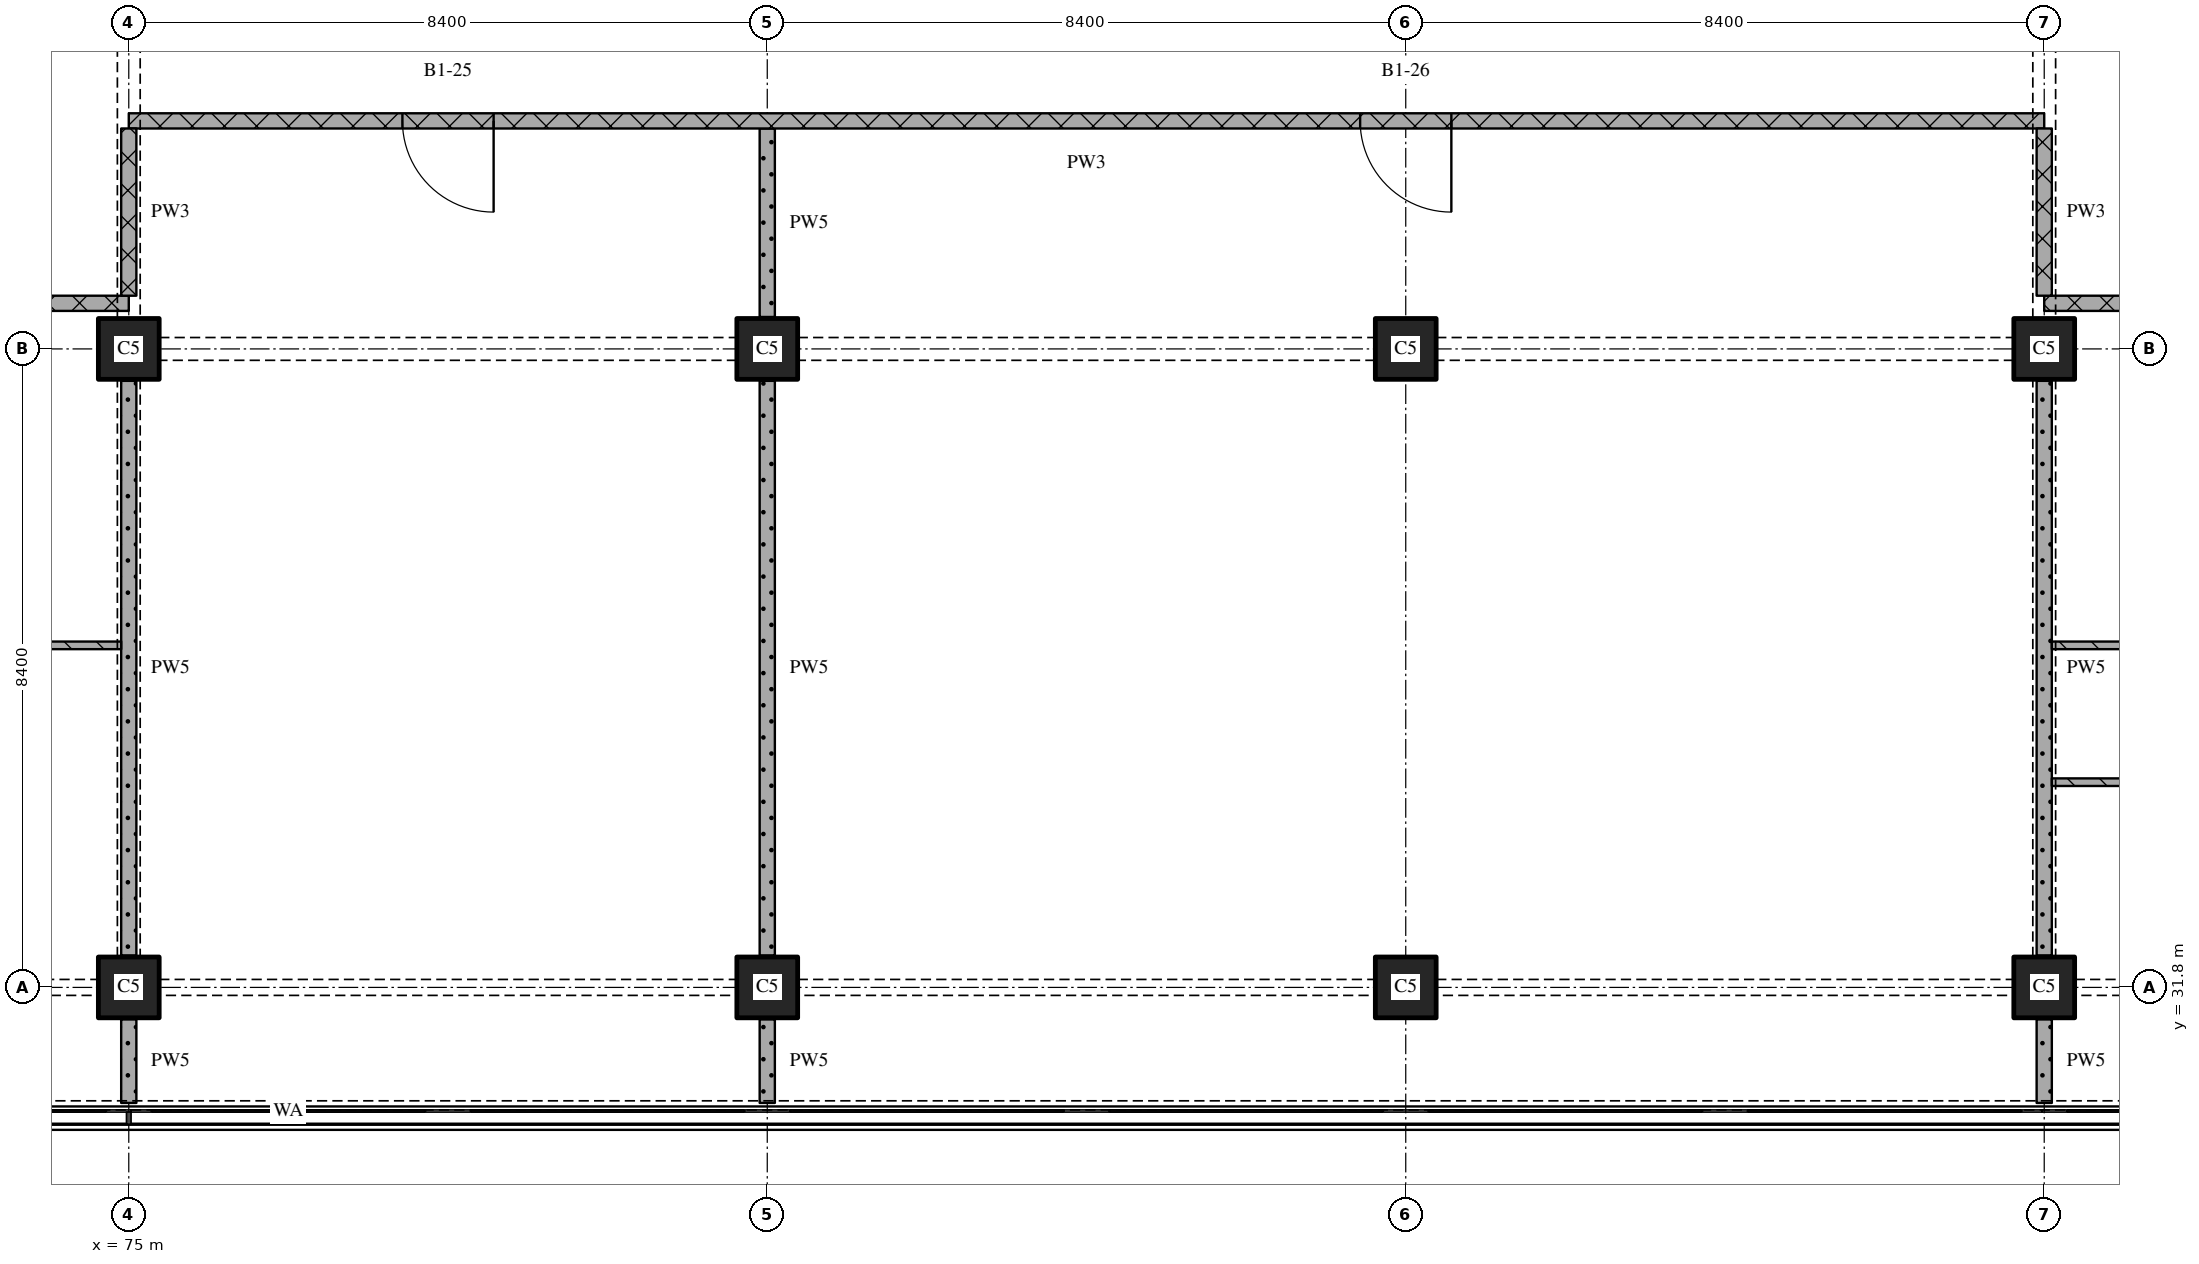
"""IFC4 building model, lengths in metres.
Left out: names, types, materials, properties, quantities, classifications, styles, units other than length and angle.
Written with IfcOpenShell. Run it as: python <this file> out.ifc"""

import sys

from ifc_helpers import new_model, si_unit, direction, frame, frame_2d, origin, origin_2d, place, context, subcontext, project, spatial, rectangle, extrude, element, fill, save


model = new_model("IFC4")
c1 = context("Model", 3, precision=1e-05, world=origin(), true_north=direction((0.0, 1.0)))
c2 = subcontext(c1, "Body", "Model", "MODEL_VIEW")
j1 = project(units=[si_unit("LENGTHUNIT", "METRE"), si_unit("PLANEANGLEUNIT", "RADIAN")], contexts=[c1])
p1 = place(None, origin())
s1 = spatial("IfcSite", under=j1, at=p1, CompositionType="ELEMENT")
p2 = place(p1, origin())
s2 = spatial("IfcBuilding", under=s1, at=p2, CompositionType="ELEMENT")
p3 = place(p2, frame((0.0, 0.0, 98.85)))
s3 = spatial("IfcBuildingStorey", under=s2, at=p3, CompositionType="ELEMENT", Elevation=98.85)
for number, where, z_axis, x_axis in (
    (1, (75.0, 31.8, 0.0), (0.0, 0.0, 1.0), (1.0, 0.0, 0.0)),
    (2, (75.0, 40.2, 0.0), (0.0, 0.0, 1.0), (1.0, 0.0, 0.0)),
    (3, (83.4, 31.8, 0.0), (0.0, 0.0, 1.0), (1.0, 0.0, 0.0)),
    (4, (83.4, 40.2, 0.0), (0.0, 0.0, 1.0), (1.0, 0.0, 0.0)),
    (5, (91.8, 31.8, 0.0), (0.0, 0.0, 1.0), (1.0, 0.0, 0.0)),
    (6, (91.8, 40.2, 0.0), (0.0, 0.0, 1.0), (1.0, 0.0, 0.0)),
    (7, (100.2, 31.8, 0.0), (0.0, 0.0, 1.0), (1.0, 0.0, 0.0)),
    (8, (100.2, 40.2, 0.0), (0.0, 0.0, 1.0), (1.0, 0.0, 0.0)),
):
    element("IfcColumn", number, at=place(p3, frame(where, z_axis=z_axis, x_axis=x_axis)), inside=s3, PredefinedType="COLUMN", context=c2, shape_type="SweptSolid", body=[
        extrude(rectangle(XDim=0.8, YDim=0.8, at=origin_2d()), origin(), (0.0, 0.0, 1.0), 3.6),
    ])
p4 = place(p3, frame((117.0, 34.5, 0.0), z_axis=(0.0, 0.0, 1.0), x_axis=(-1.0, 0.0, 0.0)))
e9 = element("IfcWall", 9, at=p4, inside=s3, PredefinedType="PARTITIONING", context=c2, shape_type="SweptSolid", body=[
    extrude(rectangle(XDim=16.7, YDim=0.1, at=frame_2d((8.35, 0.0))), origin(), (0.0, 0.0, 1.0), 3.32),
])
p5 = place(p4, frame((12.15, 0.0, 0.0)))
e10 = element("IfcOpeningElement", 10, at=p5, cuts=e9, PredefinedType="OPENING", context=c2, shape_type="SweptSolid", body=[
    extrude(rectangle(XDim=0.9, YDim=2.1, at=frame_2d((0.45, 1.05))), frame((0.0, 0.06, 0.0), z_axis=(0.0, -1.0, 0.0), x_axis=(1.0, 0.0, 0.0)), (0.0, 0.0, 1.0), 0.12),
])
p6 = place(p3, frame((65.7, 36.3, 0.0), z_axis=(0.0, 0.0, 1.0), x_axis=(1.0, 0.0, 0.0)))
e11 = element("IfcWall", 11, at=p6, inside=s3, PredefinedType="PARTITIONING", context=c2, shape_type="SweptSolid", body=[
    extrude(rectangle(XDim=9.2, YDim=0.1, at=frame_2d((4.6, 0.0))), origin(), (0.0, 0.0, 1.0), 3.32),
])
p7 = place(p6, frame((6.5, 0.0, 0.0)))
e12 = element("IfcOpeningElement", 12, at=p7, cuts=e11, PredefinedType="OPENING", context=c2, shape_type="SweptSolid", body=[
    extrude(rectangle(XDim=0.8, YDim=2.1, at=frame_2d((0.4, 1.05))), frame((0.0, 0.06, 0.0), z_axis=(0.0, -1.0, 0.0), x_axis=(1.0, 0.0, 0.0)), (0.0, 0.0, 1.0), 0.12),
])
p8 = place(p3, frame((100.3, 36.3, 0.0), z_axis=(0.0, 0.0, 1.0), x_axis=(1.0, 0.0, 0.0)))
e13 = element("IfcWall", 13, at=p8, inside=s3, PredefinedType="PARTITIONING", context=c2, shape_type="SweptSolid", body=[
    extrude(rectangle(XDim=9.2, YDim=0.1, at=frame_2d((4.6, 0.0))), origin(), (0.0, 0.0, 1.0), 3.32),
])
p9 = place(p8, frame((1.75, 0.0, 0.0)))
e14 = element("IfcOpeningElement", 14, at=p9, cuts=e13, PredefinedType="OPENING", context=c2, shape_type="SweptSolid", body=[
    extrude(rectangle(XDim=0.8, YDim=2.1, at=frame_2d((0.4, 1.05))), frame((0.0, 0.06, 0.0), z_axis=(0.0, -1.0, 0.0), x_axis=(1.0, 0.0, 0.0)), (0.0, 0.0, 1.0), 0.12),
])
p10 = place(p3, frame((75.0, 40.8, 0.0), z_axis=(0.0, 0.0, 1.0), x_axis=(-1.0, 0.0, 0.0)))
e15 = element("IfcWall", 15, at=p10, inside=s3, PredefinedType="PARTITIONING", context=c2, shape_type="SweptSolid", body=[
    extrude(rectangle(XDim=24.18, YDim=0.2, at=frame_2d((12.09, 0.0))), origin(), (0.0, 0.0, 1.0), 3.32),
])
p11 = place(p10, frame((9.55, 0.0, 0.0)))
e16 = element("IfcOpeningElement", 16, at=p11, cuts=e15, PredefinedType="OPENING", context=c2, shape_type="SweptSolid", body=[
    extrude(rectangle(XDim=1.0, YDim=2.1, at=frame_2d((0.5, 1.05))), frame((0.0, 0.11, 0.0), z_axis=(0.0, -1.0, 0.0), x_axis=(1.0, 0.0, 0.0)), (0.0, 0.0, 1.0), 0.22),
])
p12 = place(p3, frame((124.38, 40.8, 0.0), z_axis=(0.0, 0.0, 1.0), x_axis=(-1.0, 0.0, 0.0)))
e17 = element("IfcWall", 17, at=p12, inside=s3, PredefinedType="PARTITIONING", context=c2, shape_type="SweptSolid", body=[
    extrude(rectangle(XDim=24.18, YDim=0.2, at=frame_2d((12.09, 0.0))), origin(), (0.0, 0.0, 1.0), 3.32),
])
p13 = place(p12, frame((13.63, 0.0, 0.0)))
e18 = element("IfcOpeningElement", 18, at=p13, cuts=e17, PredefinedType="OPENING", context=c2, shape_type="SweptSolid", body=[
    extrude(rectangle(XDim=1.0, YDim=2.1, at=frame_2d((0.5, 1.05))), frame((0.0, 0.11, 0.0), z_axis=(0.0, -1.0, 0.0), x_axis=(1.0, 0.0, 0.0)), (0.0, 0.0, 1.0), 0.22),
])
p14 = place(p3, frame((100.2, 43.2, 0.0), z_axis=(0.0, 0.0, 1.0), x_axis=(-1.0, 0.0, 0.0)))
e19 = element("IfcWall", 19, at=p14, inside=s3, PredefinedType="PARTITIONING", context=c2, shape_type="SweptSolid", body=[
    extrude(rectangle(XDim=25.2, YDim=0.2, at=frame_2d((12.6, 0.0))), origin(), (0.0, 0.0, 1.0), 3.32),
])
p15 = place(p14, frame((7.8, 0.0, 0.0)))
e20 = element("IfcOpeningElement", 20, at=p15, cuts=e19, PredefinedType="OPENING", context=c2, shape_type="SweptSolid", body=[
    extrude(rectangle(XDim=1.2, YDim=2.1, at=frame_2d((0.6, 1.05))), frame((0.0, 0.11, 0.0), z_axis=(0.0, -1.0, 0.0), x_axis=(1.0, 0.0, 0.0)), (0.0, 0.0, 1.0), 0.22),
])
p16 = place(p14, frame((20.4, 0.0, 0.0)))
e21 = element("IfcOpeningElement", 21, at=p16, cuts=e19, PredefinedType="OPENING", context=c2, shape_type="SweptSolid", body=[
    extrude(rectangle(XDim=1.2, YDim=2.1, at=frame_2d((0.6, 1.05))), frame((0.0, 0.11, 0.0), z_axis=(0.0, -1.0, 0.0), x_axis=(1.0, 0.0, 0.0)), (0.0, 0.0, 1.0), 0.22),
])
p17 = place(p3, frame((75.0, 43.1, 0.0), z_axis=(0.0, 0.0, 1.0), x_axis=(0.0, -1.0, 0.0)))
e22 = element("IfcWall", 22, at=p17, inside=s3, PredefinedType="PARTITIONING", context=c2, shape_type="SweptSolid", body=[
    extrude(rectangle(XDim=2.2, YDim=0.2, at=frame_2d((1.1, 0.0))), origin(), (0.0, 0.0, 1.0), 2.43),
])
p18 = place(p3, frame((75.0, 31.38, 0.0), z_axis=(0.0, 0.0, 1.0), x_axis=(0.0, -1.0, 0.0)))
e23 = element("IfcWall", 23, at=p18, inside=s3, PredefinedType="PARTITIONING", context=c2, shape_type="SweptSolid", body=[
    extrude(rectangle(XDim=1.1, YDim=0.2, at=frame_2d((0.55, 0.0))), origin(), (0.0, 0.0, 1.0), 3.32),
])
p19 = place(p3, frame((75.0, 39.78, 0.0), z_axis=(0.0, 0.0, 1.0), x_axis=(0.0, -1.0, 0.0)))
e24 = element("IfcWall", 24, at=p19, inside=s3, PredefinedType="PARTITIONING", context=c2, shape_type="SweptSolid", body=[
    extrude(rectangle(XDim=7.56, YDim=0.2, at=frame_2d((3.78, 0.0))), origin(), (0.0, 0.0, 1.0), 2.83),
])
p20 = place(p3, frame((83.4, 31.38, 0.0), z_axis=(0.0, 0.0, 1.0), x_axis=(0.0, -1.0, 0.0)))
e25 = element("IfcWall", 25, at=p20, inside=s3, PredefinedType="PARTITIONING", context=c2, shape_type="SweptSolid", body=[
    extrude(rectangle(XDim=1.1, YDim=0.2, at=frame_2d((0.55, 0.0))), origin(), (0.0, 0.0, 1.0), 3.32),
])
p21 = place(p3, frame((83.4, 39.78, 0.0), z_axis=(0.0, 0.0, 1.0), x_axis=(0.0, -1.0, 0.0)))
e26 = element("IfcWall", 26, at=p21, inside=s3, PredefinedType="PARTITIONING", context=c2, shape_type="SweptSolid", body=[
    extrude(rectangle(XDim=7.56, YDim=0.2, at=frame_2d((3.78, 0.0))), origin(), (0.0, 0.0, 1.0), 3.32),
])
p22 = place(p3, frame((83.4, 43.1, 0.0), z_axis=(0.0, 0.0, 1.0), x_axis=(0.0, -1.0, 0.0)))
e27 = element("IfcWall", 27, at=p22, inside=s3, PredefinedType="PARTITIONING", context=c2, shape_type="SweptSolid", body=[
    extrude(rectangle(XDim=2.48, YDim=0.2, at=frame_2d((1.24, 0.0))), origin(), (0.0, 0.0, 1.0), 3.32),
])
p23 = place(p3, frame((100.2, 43.1, 0.0), z_axis=(0.0, 0.0, 1.0), x_axis=(0.0, -1.0, 0.0)))
e28 = element("IfcWall", 28, at=p23, inside=s3, PredefinedType="PARTITIONING", context=c2, shape_type="SweptSolid", body=[
    extrude(rectangle(XDim=2.2, YDim=0.2, at=frame_2d((1.1, 0.0))), origin(), (0.0, 0.0, 1.0), 2.43),
])
p24 = place(p3, frame((100.2, 31.38, 0.0), z_axis=(0.0, 0.0, 1.0), x_axis=(0.0, -1.0, 0.0)))
e29 = element("IfcWall", 29, at=p24, inside=s3, PredefinedType="PARTITIONING", context=c2, shape_type="SweptSolid", body=[
    extrude(rectangle(XDim=1.1, YDim=0.2, at=frame_2d((0.55, 0.0))), origin(), (0.0, 0.0, 1.0), 3.32),
])
p25 = place(p3, frame((100.2, 39.78, 0.0), z_axis=(0.0, 0.0, 1.0), x_axis=(0.0, -1.0, 0.0)))
e30 = element("IfcWall", 30, at=p25, inside=s3, PredefinedType="PARTITIONING", context=c2, shape_type="SweptSolid", body=[
    extrude(rectangle(XDim=7.56, YDim=0.2, at=frame_2d((3.78, 0.0))), origin(), (0.0, 0.0, 1.0), 2.83),
])
p26 = place(p15, origin())
e31 = element("IfcDoor", 31, at=p26, inside=s3, OperationType="SINGLE_SWING_LEFT", PredefinedType="DOOR", context=c2, shape_type="SweptSolid", body=[
    extrude(rectangle(XDim=1.2, YDim=2.1, at=frame_2d((0.6, 1.05))), frame((0.0, 0.025, 0.0), z_axis=(0.0, -1.0, 0.0), x_axis=(1.0, 0.0, 0.0)), (0.0, 0.0, 1.0), 0.05),
])
fill(e20, e31)
p27 = place(p16, origin())
e32 = element("IfcDoor", 32, at=p27, inside=s3, OperationType="SINGLE_SWING_LEFT", PredefinedType="DOOR", context=c2, shape_type="SweptSolid", body=[
    extrude(rectangle(XDim=1.2, YDim=2.1, at=frame_2d((0.6, 1.05))), frame((0.0, 0.025, 0.0), z_axis=(0.0, -1.0, 0.0), x_axis=(1.0, 0.0, 0.0)), (0.0, 0.0, 1.0), 0.05),
])
fill(e21, e32)
save(model, sys.argv[1])
